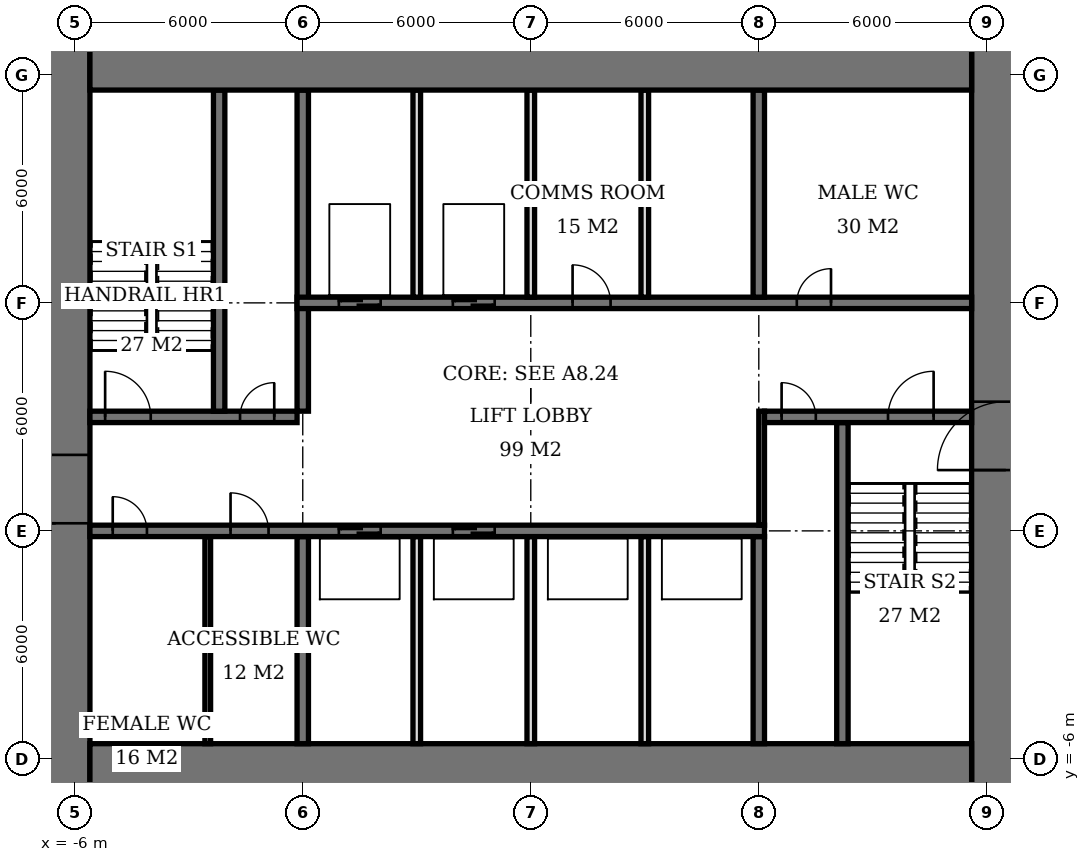
"""IFC4 building model, lengths in metres.
Left out: names, types, materials, properties, quantities, classifications, styles, units other than length and angle.
Written with IfcOpenShell. Run it as: python <this file> out.ifc"""

import sys

from ifc_helpers import new_model, si_unit, direction, frame, frame_2d, origin, place, context, subcontext, project, spatial, rectangle, extrude, element, fill, save


model = new_model("IFC4")
c1 = context("Model", 3, precision=1e-05, world=origin(), true_north=direction((0.0, 1.0)))
c2 = subcontext(c1, "Body", "Model", "MODEL_VIEW")
j1 = project(units=[si_unit("LENGTHUNIT", "METRE"), si_unit("PLANEANGLEUNIT", "RADIAN")], contexts=[c1])
p1 = place(None, origin())
s1 = spatial("IfcSite", under=j1, at=p1, CompositionType="ELEMENT")
p2 = place(p1, origin())
s2 = spatial("IfcBuilding", under=s1, at=p2, CompositionType="ELEMENT")
p3 = place(p2, frame((0.0, 0.0, 140.6)))
s3 = spatial("IfcBuildingStorey", under=s2, at=p3, CompositionType="ELEMENT", Elevation=140.6)
for number, where, z_axis, x_axis in (
    (1, (-5.6, -6.6, 0.0), (0.0, 0.0, 1.0), (1.0, 0.0, 0.0)),
    (2, (-5.6, 12.6, 0.0), (0.0, 0.0, 1.0), (1.0, 0.0, 0.0)),
):
    element("IfcWall", number, at=place(p3, frame(where, z_axis=z_axis, x_axis=x_axis)), inside=s3, PredefinedType="SHEAR", context=c2, shape_type="SweptSolid", body=[
        extrude(rectangle(XDim=23.2, YDim=2.0, at=frame_2d((11.6, 0.0))), origin(), (0.0, 0.0, 1.0), 3.9),
    ])
p4 = place(p3, frame((-6.5, -7.6, 0.0), z_axis=(0.0, 0.0, 1.0), x_axis=(0.0, 1.0, 0.0)))
e3 = element("IfcWall", 3, at=p4, inside=s3, PredefinedType="SHEAR", context=c2, shape_type="SweptSolid", body=[
    extrude(rectangle(XDim=21.2, YDim=1.8, at=frame_2d((10.6, 0.0))), origin(), (0.0, 0.0, 1.0), 3.9),
])
p5 = place(p4, frame((7.8, 0.0, 0.0)))
e4 = element("IfcOpeningElement", 4, at=p5, cuts=e3, PredefinedType="OPENING", context=c2, shape_type="SweptSolid", body=[
    extrude(rectangle(XDim=1.8, YDim=2.4, at=frame_2d((0.9, 1.2))), frame((0.0, 0.91, 0.0), z_axis=(0.0, -1.0, 0.0), x_axis=(1.0, 0.0, 0.0)), (0.0, 0.0, 1.0), 1.82),
])
p6 = place(p3, frame((18.5, -7.6, 0.0), z_axis=(0.0, 0.0, 1.0), x_axis=(0.0, 1.0, 0.0)))
e5 = element("IfcWall", 5, at=p6, inside=s3, PredefinedType="SHEAR", context=c2, shape_type="SweptSolid", body=[
    extrude(rectangle(XDim=21.2, YDim=1.8, at=frame_2d((10.6, 0.0))), origin(), (0.0, 0.0, 1.0), 3.9),
])
p7 = place(p6, frame((9.2, 0.0, 0.0)))
e6 = element("IfcOpeningElement", 6, at=p7, cuts=e5, PredefinedType="OPENING", context=c2, shape_type="SweptSolid", body=[
    extrude(rectangle(XDim=1.8, YDim=2.4, at=frame_2d((0.9, 1.2))), frame((0.0, 0.91, 0.0), z_axis=(0.0, -1.0, 0.0), x_axis=(1.0, 0.0, 0.0)), (0.0, 0.0, 1.0), 1.82),
])
p8 = place(p3, frame((-5.6, 0.0, 0.0), z_axis=(0.0, 0.0, 1.0), x_axis=(1.0, 0.0, 0.0)))
e7 = element("IfcWall", 7, at=p8, inside=s3, PredefinedType="SHEAR", context=c2, shape_type="SweptSolid", body=[
    extrude(rectangle(XDim=17.75, YDim=0.3, at=frame_2d((8.875, 0.0))), origin(), (0.0, 0.0, 1.0), 3.9),
])
p9 = place(p8, frame((0.6, 0.0, 0.0)))
e8 = element("IfcOpeningElement", 8, at=p9, cuts=e7, PredefinedType="OPENING", context=c2, shape_type="SweptSolid", body=[
    extrude(rectangle(XDim=0.9, YDim=2.1, at=frame_2d((0.45, 1.05))), frame((0.0, 0.16, 0.0), z_axis=(0.0, -1.0, 0.0), x_axis=(1.0, 0.0, 0.0)), (0.0, 0.0, 1.0), 0.32),
])
p10 = place(p8, frame((3.7, 0.0, 0.0)))
e9 = element("IfcOpeningElement", 9, at=p10, cuts=e7, PredefinedType="OPENING", context=c2, shape_type="SweptSolid", body=[
    extrude(rectangle(XDim=1.0, YDim=2.1, at=frame_2d((0.5, 1.05))), frame((0.0, 0.16, 0.0), z_axis=(0.0, -1.0, 0.0), x_axis=(1.0, 0.0, 0.0)), (0.0, 0.0, 1.0), 0.32),
])
p11 = place(p8, frame((6.55, 0.0, 0.0)))
e10 = element("IfcOpeningElement", 10, at=p11, cuts=e7, PredefinedType="OPENING", context=c2, shape_type="SweptSolid", body=[
    extrude(rectangle(XDim=1.1, YDim=2.1, at=frame_2d((0.55, 1.05))), frame((0.0, 0.16, 0.0), z_axis=(0.0, -1.0, 0.0), x_axis=(1.0, 0.0, 0.0)), (0.0, 0.0, 1.0), 0.32),
])
p12 = place(p8, frame((9.55, 0.0, 0.0)))
e11 = element("IfcOpeningElement", 11, at=p12, cuts=e7, PredefinedType="OPENING", context=c2, shape_type="SweptSolid", body=[
    extrude(rectangle(XDim=1.1, YDim=2.1, at=frame_2d((0.55, 1.05))), frame((0.0, 0.16, 0.0), z_axis=(0.0, -1.0, 0.0), x_axis=(1.0, 0.0, 0.0)), (0.0, 0.0, 1.0), 0.32),
])
p13 = place(p3, frame((-5.6, 3.0, 0.0), z_axis=(0.0, 0.0, 1.0), x_axis=(1.0, 0.0, 0.0)))
e12 = element("IfcWall", 12, at=p13, inside=s3, PredefinedType="SHEAR", context=c2, shape_type="SweptSolid", body=[
    extrude(rectangle(XDim=5.45, YDim=0.3, at=frame_2d((2.725, 0.0))), origin(), (0.0, 0.0, 1.0), 3.9),
])
p14 = place(p13, frame((0.4, 0.0, 0.0)))
e13 = element("IfcOpeningElement", 13, at=p14, cuts=e12, PredefinedType="OPENING", context=c2, shape_type="SweptSolid", body=[
    extrude(rectangle(XDim=1.2, YDim=2.1, at=frame_2d((0.6, 1.05))), frame((0.0, 0.16, 0.0), z_axis=(0.0, -1.0, 0.0), x_axis=(1.0, 0.0, 0.0)), (0.0, 0.0, 1.0), 0.32),
])
p15 = place(p13, frame((3.95, 0.0, 0.0)))
e14 = element("IfcOpeningElement", 14, at=p15, cuts=e12, PredefinedType="OPENING", context=c2, shape_type="SweptSolid", body=[
    extrude(rectangle(XDim=0.9, YDim=2.1, at=frame_2d((0.45, 1.05))), frame((0.0, 0.16, 0.0), z_axis=(0.0, -1.0, 0.0), x_axis=(1.0, 0.0, 0.0)), (0.0, 0.0, 1.0), 0.32),
])
p16 = place(p3, frame((12.15, 3.0, 0.0), z_axis=(0.0, 0.0, 1.0), x_axis=(1.0, 0.0, 0.0)))
e15 = element("IfcWall", 15, at=p16, inside=s3, PredefinedType="SHEAR", context=c2, shape_type="SweptSolid", body=[
    extrude(rectangle(XDim=5.45, YDim=0.3, at=frame_2d((2.725, 0.0))), origin(), (0.0, 0.0, 1.0), 3.9),
])
p17 = place(p16, frame((3.25, 0.0, 0.0)))
e16 = element("IfcOpeningElement", 16, at=p17, cuts=e15, PredefinedType="OPENING", context=c2, shape_type="SweptSolid", body=[
    extrude(rectangle(XDim=1.2, YDim=2.1, at=frame_2d((0.6, 1.05))), frame((0.0, 0.16, 0.0), z_axis=(0.0, -1.0, 0.0), x_axis=(1.0, 0.0, 0.0)), (0.0, 0.0, 1.0), 0.32),
])
p18 = place(p16, frame((0.45, 0.0, 0.0)))
e17 = element("IfcOpeningElement", 17, at=p18, cuts=e15, PredefinedType="OPENING", context=c2, shape_type="SweptSolid", body=[
    extrude(rectangle(XDim=0.9, YDim=2.1, at=frame_2d((0.45, 1.05))), frame((0.0, 0.16, 0.0), z_axis=(0.0, -1.0, 0.0), x_axis=(1.0, 0.0, 0.0)), (0.0, 0.0, 1.0), 0.32),
])
p19 = place(p3, frame((-0.15, 6.0, 0.0), z_axis=(0.0, 0.0, 1.0), x_axis=(1.0, 0.0, 0.0)))
e18 = element("IfcWall", 18, at=p19, inside=s3, PredefinedType="SHEAR", context=c2, shape_type="SweptSolid", body=[
    extrude(rectangle(XDim=17.75, YDim=0.3, at=frame_2d((8.875, 0.0))), origin(), (0.0, 0.0, 1.0), 3.9),
])
p20 = place(p19, frame((13.15, 0.0, 0.0)))
e19 = element("IfcOpeningElement", 19, at=p20, cuts=e18, PredefinedType="OPENING", context=c2, shape_type="SweptSolid", body=[
    extrude(rectangle(XDim=0.9, YDim=2.1, at=frame_2d((0.45, 1.05))), frame((0.0, 0.16, 0.0), z_axis=(0.0, -1.0, 0.0), x_axis=(1.0, 0.0, 0.0)), (0.0, 0.0, 1.0), 0.32),
])
p21 = place(p19, frame((7.25, 0.0, 0.0)))
e20 = element("IfcOpeningElement", 20, at=p21, cuts=e18, PredefinedType="OPENING", context=c2, shape_type="SweptSolid", body=[
    extrude(rectangle(XDim=1.0, YDim=2.1, at=frame_2d((0.5, 1.05))), frame((0.0, 0.16, 0.0), z_axis=(0.0, -1.0, 0.0), x_axis=(1.0, 0.0, 0.0)), (0.0, 0.0, 1.0), 0.32),
])
p22 = place(p19, frame((1.1, 0.0, 0.0)))
e21 = element("IfcOpeningElement", 21, at=p22, cuts=e18, PredefinedType="OPENING", context=c2, shape_type="SweptSolid", body=[
    extrude(rectangle(XDim=1.1, YDim=2.1, at=frame_2d((0.55, 1.05))), frame((0.0, 0.16, 0.0), z_axis=(0.0, -1.0, 0.0), x_axis=(1.0, 0.0, 0.0)), (0.0, 0.0, 1.0), 0.32),
])
p23 = place(p19, frame((4.1, 0.0, 0.0)))
e22 = element("IfcOpeningElement", 22, at=p23, cuts=e18, PredefinedType="OPENING", context=c2, shape_type="SweptSolid", body=[
    extrude(rectangle(XDim=1.1, YDim=2.1, at=frame_2d((0.55, 1.05))), frame((0.0, 0.16, 0.0), z_axis=(0.0, -1.0, 0.0), x_axis=(1.0, 0.0, 0.0)), (0.0, 0.0, 1.0), 0.32),
])
p24 = place(p3, frame((0.0, -5.6, 0.0), z_axis=(0.0, 0.0, 1.0), x_axis=(0.0, 1.0, 0.0)))
e23 = element("IfcWall", 23, at=p24, inside=s3, PredefinedType="SHEAR", context=c2, shape_type="SweptSolid", body=[
    extrude(rectangle(XDim=5.45, YDim=0.3, at=frame_2d((2.725, 0.0))), origin(), (0.0, 0.0, 1.0), 3.9),
])
p25 = place(p3, frame((0.0, 3.15, 0.0), z_axis=(0.0, 0.0, 1.0), x_axis=(0.0, 1.0, 0.0)))
e24 = element("IfcWall", 24, at=p25, inside=s3, PredefinedType="SHEAR", context=c2, shape_type="SweptSolid", body=[
    extrude(rectangle(XDim=8.45, YDim=0.3, at=frame_2d((4.225, 0.0))), origin(), (0.0, 0.0, 1.0), 3.9),
])
for number, where, z_axis, x_axis in (
    (25, (12.0, -5.6, 0.0), (0.0, 0.0, 1.0), (0.0, 1.0, 0.0)),
    (26, (12.0, 6.15, 0.0), (0.0, 0.0, 1.0), (0.0, 1.0, 0.0)),
):
    element("IfcWall", number, at=place(p3, frame(where, z_axis=z_axis, x_axis=x_axis)), inside=s3, PredefinedType="SHEAR", context=c2, shape_type="SweptSolid", body=[
        extrude(rectangle(XDim=5.45, YDim=0.3, at=frame_2d((2.725, 0.0))), origin(), (0.0, 0.0, 1.0), 3.9),
    ])
for number, where, z_axis, x_axis in (
    (27, (-2.2, 3.15, 0.0), (0.0, 0.0, 1.0), (0.0, 1.0, 0.0)),
    (28, (14.2, -5.6, 0.0), (0.0, 0.0, 1.0), (0.0, 1.0, 0.0)),
):
    element("IfcWall", number, at=place(p3, frame(where, z_axis=z_axis, x_axis=x_axis)), inside=s3, PredefinedType="SHEAR", context=c2, shape_type="SweptSolid", body=[
        extrude(rectangle(XDim=8.45, YDim=0.3, at=frame_2d((4.225, 0.0))), origin(), (0.0, 0.0, 1.0), 3.9),
    ])
for number, where, z_axis, x_axis in (
    (29, (3.0, 6.15, 0.0), (0.0, 0.0, 1.0), (0.0, 1.0, 0.0)),
    (30, (6.0, 6.15, 0.0), (0.0, 0.0, 1.0), (0.0, 1.0, 0.0)),
    (31, (9.0, 6.15, 0.0), (0.0, 0.0, 1.0), (0.0, 1.0, 0.0)),
    (32, (3.0, -5.6, 0.0), (0.0, 0.0, 1.0), (0.0, 1.0, 0.0)),
    (33, (6.0, -5.6, 0.0), (0.0, 0.0, 1.0), (0.0, 1.0, 0.0)),
    (34, (9.0, -5.6, 0.0), (0.0, 0.0, 1.0), (0.0, 1.0, 0.0)),
):
    element("IfcWall", number, at=place(p3, frame(where, z_axis=z_axis, x_axis=x_axis)), inside=s3, PredefinedType="SOLIDWALL", context=c2, shape_type="SweptSolid", body=[
        extrude(rectangle(XDim=5.45, YDim=0.2, at=frame_2d((2.725, 0.0))), origin(), (0.0, 0.0, 1.0), 3.9),
    ])
p26 = place(p3, frame((-2.5, -5.6, 0.0), z_axis=(0.0, 0.0, 1.0), x_axis=(0.0, 1.0, 0.0)))
e35 = element("IfcWall", 35, at=p26, inside=s3, PredefinedType="PLUMBINGWALL", context=c2, shape_type="SweptSolid", body=[
    extrude(rectangle(XDim=5.45, YDim=0.15, at=frame_2d((2.725, 0.0))), origin(), (0.0, 0.0, 1.0), 3.65),
])
p27 = place(p3, frame((12.075, 0.15, 0.0), z_axis=(0.0, 0.0, 1.0), x_axis=(0.0, 1.0, 0.0)))
e36 = element("IfcWall", 36, at=p27, inside=s3, PredefinedType="PARTITIONING", context=c2, shape_type="SweptSolid", body=[
    extrude(rectangle(XDim=3.0, YDim=0.15, at=frame_2d((1.5, 0.0))), origin(), (0.0, 0.0, 1.0), 3.65),
])
p28 = place(p5, origin())
e37 = element("IfcDoor", 37, at=p28, inside=s3, OperationType="DOUBLE_DOOR_SINGLE_SWING", PredefinedType="DOOR", context=c2, shape_type="SweptSolid", body=[
    extrude(rectangle(XDim=1.8, YDim=2.4, at=frame_2d((0.9, 1.2))), frame((0.0, 0.025, 0.0), z_axis=(0.0, -1.0, 0.0), x_axis=(1.0, 0.0, 0.0)), (0.0, 0.0, 1.0), 0.05),
])
fill(e4, e37)
p29 = place(p7, origin())
e38 = element("IfcDoor", 38, at=p29, inside=s3, OperationType="DOUBLE_DOOR_SINGLE_SWING", PredefinedType="DOOR", context=c2, shape_type="SweptSolid", body=[
    extrude(rectangle(XDim=1.8, YDim=2.4, at=frame_2d((0.9, 1.2))), frame((0.0, 0.025, 0.0), z_axis=(0.0, -1.0, 0.0), x_axis=(1.0, 0.0, 0.0)), (0.0, 0.0, 1.0), 0.05),
])
fill(e6, e38)
p30 = place(p14, origin())
e39 = element("IfcDoor", 39, at=p30, inside=s3, OperationType="SINGLE_SWING_LEFT", PredefinedType="DOOR", context=c2, shape_type="SweptSolid", body=[
    extrude(rectangle(XDim=1.2, YDim=2.1, at=frame_2d((0.6, 1.05))), frame((0.0, 0.025, 0.0), z_axis=(0.0, -1.0, 0.0), x_axis=(1.0, 0.0, 0.0)), (0.0, 0.0, 1.0), 0.05),
])
fill(e13, e39)
p31 = place(p15, origin())
e40 = element("IfcDoor", 40, at=p31, inside=s3, OperationType="SINGLE_SWING_RIGHT", PredefinedType="DOOR", context=c2, shape_type="SweptSolid", body=[
    extrude(rectangle(XDim=0.9, YDim=2.1, at=frame_2d((0.45, 1.05))), frame((0.0, 0.025, 0.0), z_axis=(0.0, -1.0, 0.0), x_axis=(1.0, 0.0, 0.0)), (0.0, 0.0, 1.0), 0.05),
])
fill(e14, e40)
p32 = place(p17, origin())
e41 = element("IfcDoor", 41, at=p32, inside=s3, OperationType="SINGLE_SWING_RIGHT", PredefinedType="DOOR", context=c2, shape_type="SweptSolid", body=[
    extrude(rectangle(XDim=1.2, YDim=2.1, at=frame_2d((0.6, 1.05))), frame((0.0, 0.025, 0.0), z_axis=(0.0, -1.0, 0.0), x_axis=(1.0, 0.0, 0.0)), (0.0, 0.0, 1.0), 0.05),
])
fill(e16, e41)
p33 = place(p18, origin())
e42 = element("IfcDoor", 42, at=p33, inside=s3, OperationType="SINGLE_SWING_LEFT", PredefinedType="DOOR", context=c2, shape_type="SweptSolid", body=[
    extrude(rectangle(XDim=0.9, YDim=2.1, at=frame_2d((0.45, 1.05))), frame((0.0, 0.025, 0.0), z_axis=(0.0, -1.0, 0.0), x_axis=(1.0, 0.0, 0.0)), (0.0, 0.0, 1.0), 0.05),
])
fill(e17, e42)
p34 = place(p9, origin())
e43 = element("IfcDoor", 43, at=p34, inside=s3, OperationType="SINGLE_SWING_LEFT", PredefinedType="DOOR", context=c2, shape_type="SweptSolid", body=[
    extrude(rectangle(XDim=0.9, YDim=2.1, at=frame_2d((0.45, 1.05))), frame((0.0, 0.025, 0.0), z_axis=(0.0, -1.0, 0.0), x_axis=(1.0, 0.0, 0.0)), (0.0, 0.0, 1.0), 0.05),
])
fill(e8, e43)
p35 = place(p10, origin())
e44 = element("IfcDoor", 44, at=p35, inside=s3, OperationType="SINGLE_SWING_LEFT", PredefinedType="DOOR", context=c2, shape_type="SweptSolid", body=[
    extrude(rectangle(XDim=1.0, YDim=2.1, at=frame_2d((0.5, 1.05))), frame((0.0, 0.025, 0.0), z_axis=(0.0, -1.0, 0.0), x_axis=(1.0, 0.0, 0.0)), (0.0, 0.0, 1.0), 0.05),
])
fill(e9, e44)
p36 = place(p20, origin())
e45 = element("IfcDoor", 45, at=p36, inside=s3, OperationType="SINGLE_SWING_RIGHT", PredefinedType="DOOR", context=c2, shape_type="SweptSolid", body=[
    extrude(rectangle(XDim=0.9, YDim=2.1, at=frame_2d((0.45, 1.05))), frame((0.0, 0.025, 0.0), z_axis=(0.0, -1.0, 0.0), x_axis=(1.0, 0.0, 0.0)), (0.0, 0.0, 1.0), 0.05),
])
fill(e19, e45)
p37 = place(p21, origin())
e46 = element("IfcDoor", 46, at=p37, inside=s3, OperationType="SINGLE_SWING_LEFT", PredefinedType="DOOR", context=c2, shape_type="SweptSolid", body=[
    extrude(rectangle(XDim=1.0, YDim=2.1, at=frame_2d((0.5, 1.05))), frame((0.0, 0.025, 0.0), z_axis=(0.0, -1.0, 0.0), x_axis=(1.0, 0.0, 0.0)), (0.0, 0.0, 1.0), 0.05),
])
fill(e20, e46)
p38 = place(p22, origin())
e47 = element("IfcDoor", 47, at=p38, inside=s3, OperationType="DOUBLE_DOOR_SLIDING", PredefinedType="USERDEFINED", context=c2, shape_type="SweptSolid", body=[
    extrude(rectangle(XDim=1.1, YDim=2.1, at=frame_2d((0.55, 1.05))), frame((0.0, 0.025, 0.0), z_axis=(0.0, -1.0, 0.0), x_axis=(1.0, 0.0, 0.0)), (0.0, 0.0, 1.0), 0.05),
])
fill(e21, e47)
p39 = place(p23, origin())
e48 = element("IfcDoor", 48, at=p39, inside=s3, OperationType="DOUBLE_DOOR_SLIDING", PredefinedType="USERDEFINED", context=c2, shape_type="SweptSolid", body=[
    extrude(rectangle(XDim=1.1, YDim=2.1, at=frame_2d((0.55, 1.05))), frame((0.0, 0.025, 0.0), z_axis=(0.0, -1.0, 0.0), x_axis=(1.0, 0.0, 0.0)), (0.0, 0.0, 1.0), 0.05),
])
fill(e22, e48)
p40 = place(p11, origin())
e49 = element("IfcDoor", 49, at=p40, inside=s3, OperationType="DOUBLE_DOOR_SLIDING", PredefinedType="USERDEFINED", context=c2, shape_type="SweptSolid", body=[
    extrude(rectangle(XDim=1.1, YDim=2.1, at=frame_2d((0.55, 1.05))), frame((0.0, 0.025, 0.0), z_axis=(0.0, -1.0, 0.0), x_axis=(1.0, 0.0, 0.0)), (0.0, 0.0, 1.0), 0.05),
])
fill(e10, e49)
p41 = place(p12, origin())
e50 = element("IfcDoor", 50, at=p41, inside=s3, OperationType="DOUBLE_DOOR_SLIDING", PredefinedType="USERDEFINED", context=c2, shape_type="SweptSolid", body=[
    extrude(rectangle(XDim=1.1, YDim=2.1, at=frame_2d((0.55, 1.05))), frame((0.0, 0.025, 0.0), z_axis=(0.0, -1.0, 0.0), x_axis=(1.0, 0.0, 0.0)), (0.0, 0.0, 1.0), 0.05),
])
fill(e11, e50)
save(model, sys.argv[1])
